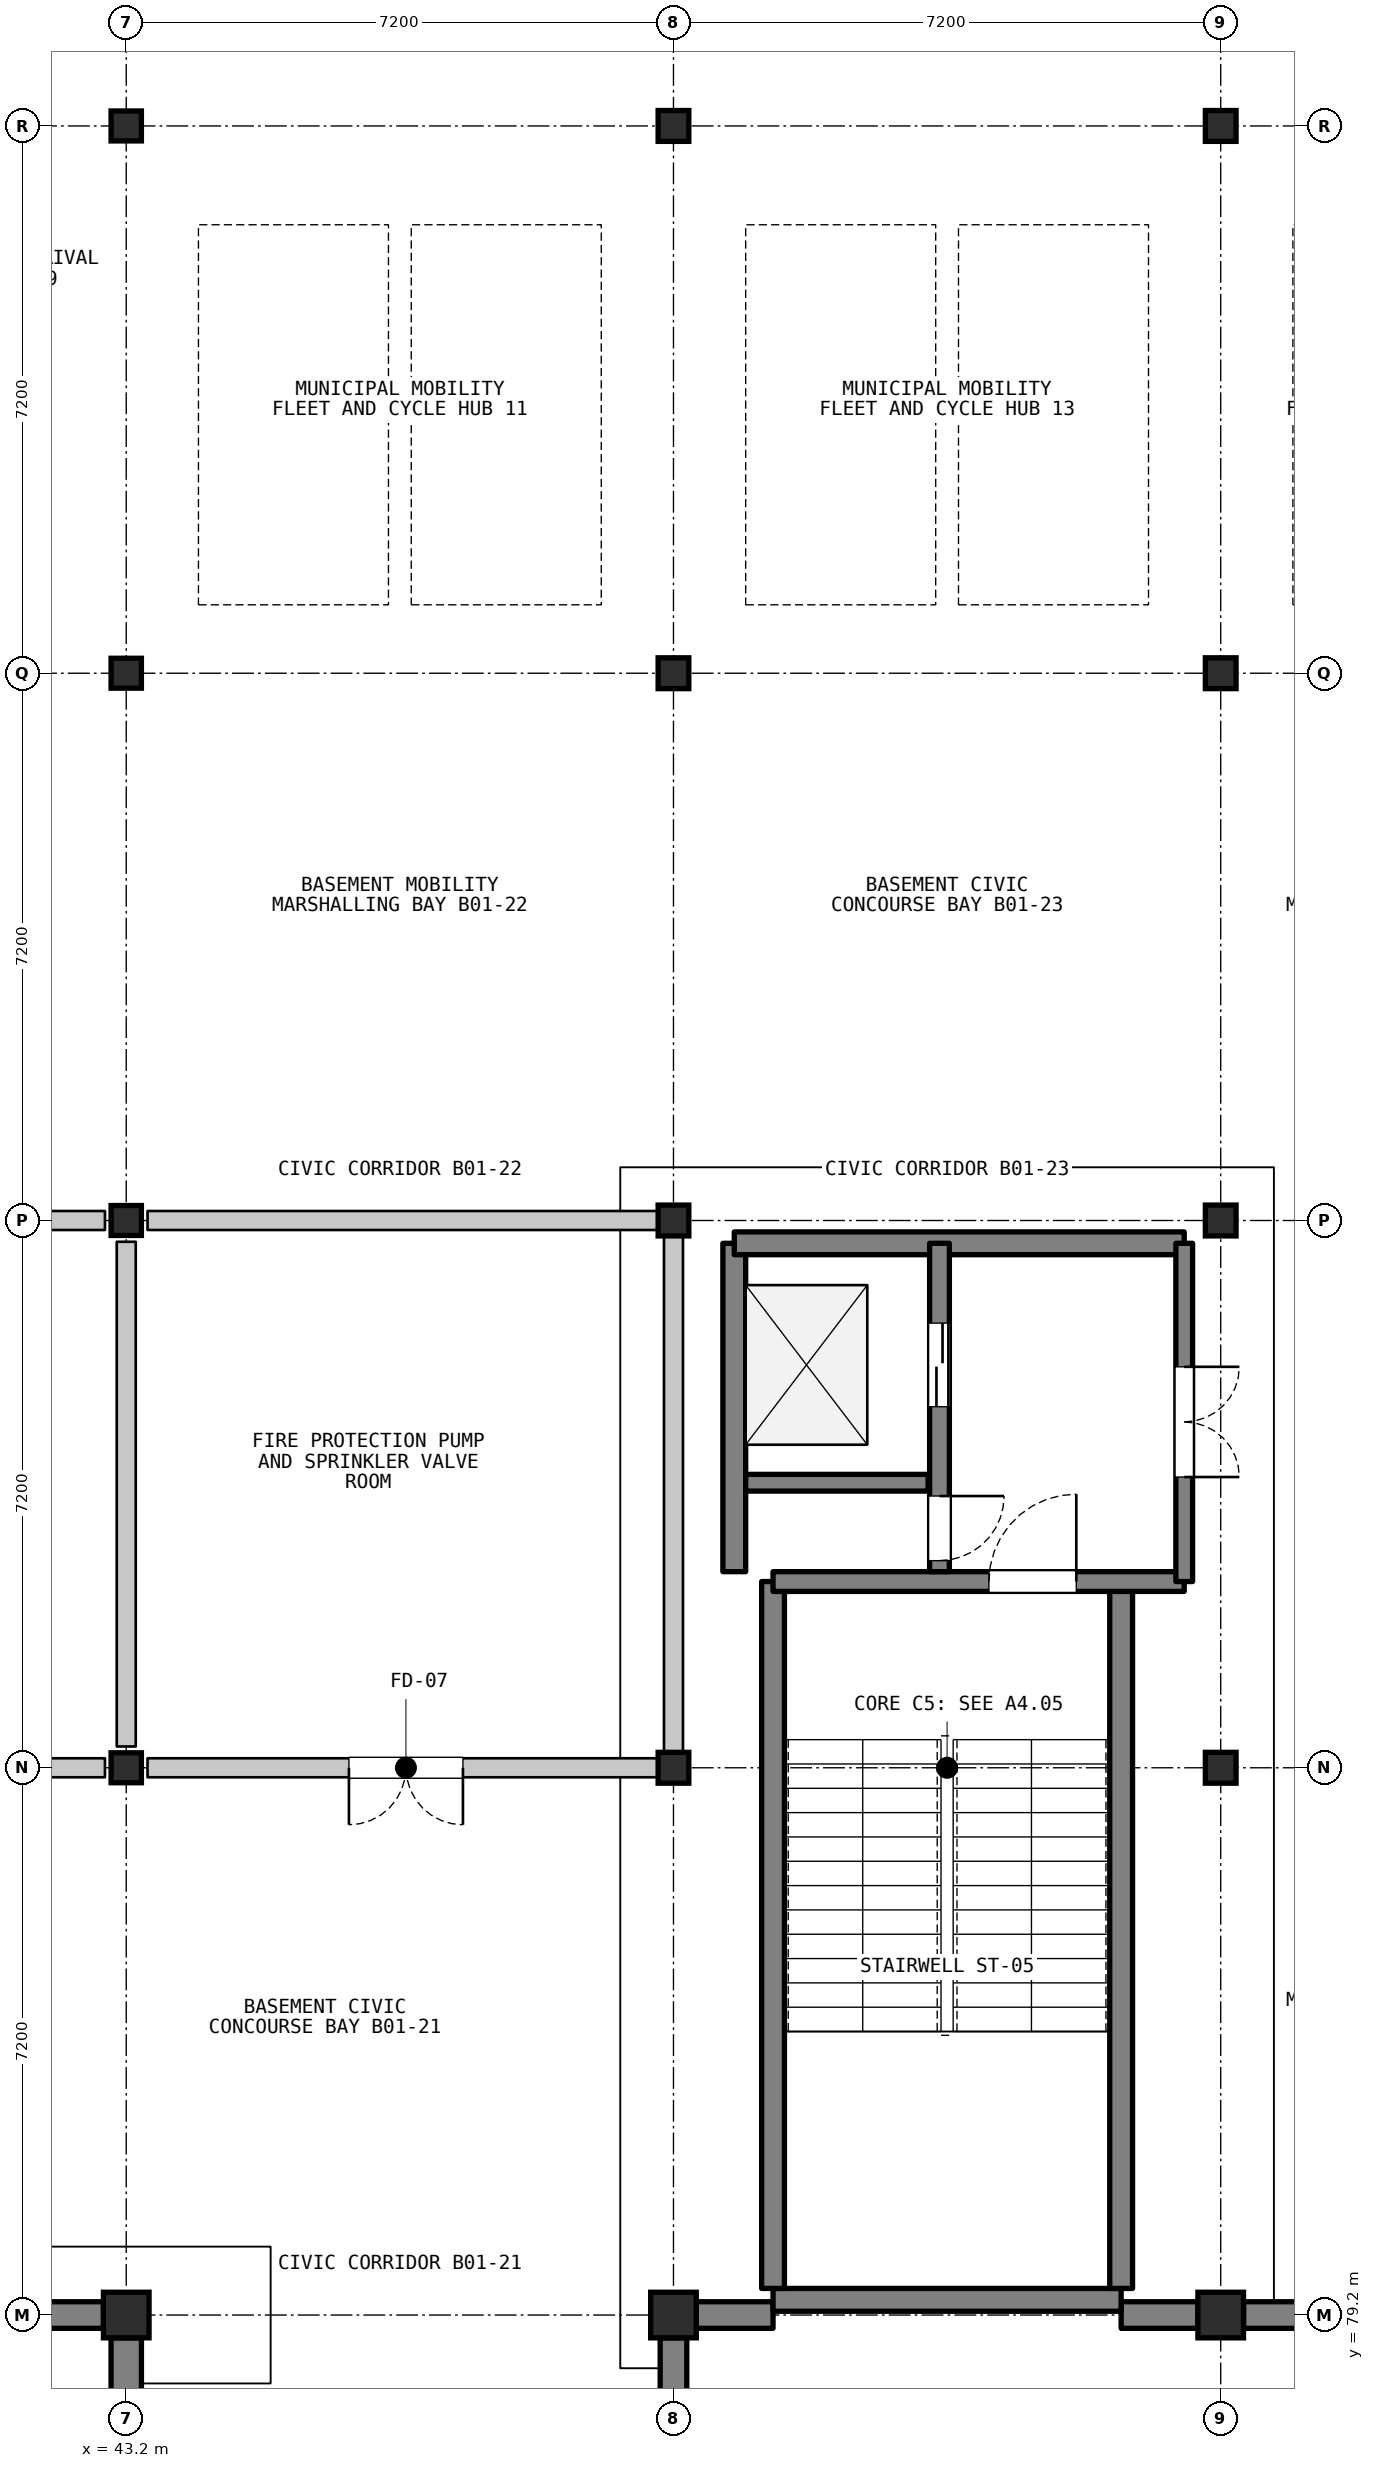
"""IFC4 building model, lengths in metres.
Left out: names, types, materials, properties, quantities, classifications, styles, units other than length and angle.
Written with IfcOpenShell. Run it as: python <this file> out.ifc"""

import sys

from ifc_helpers import new_model, si_unit, direction, frame, frame_2d, origin, origin_2d, place, context, subcontext, project, spatial, rectangle, i_section, extrude, element, fill, save


model = new_model("IFC4")
c1 = context("Model", 3, precision=1e-05, world=origin(), true_north=direction((0.0, 1.0)))
c2 = subcontext(c1, "Body", "Model", "MODEL_VIEW")
j1 = project(units=[si_unit("LENGTHUNIT", "METRE"), si_unit("PLANEANGLEUNIT", "RADIAN")], contexts=[c1])
p1 = place(None, origin())
s1 = spatial("IfcSite", under=j1, at=p1, CompositionType="ELEMENT")
p2 = place(p1, origin())
s2 = spatial("IfcBuilding", under=s1, at=p2, CompositionType="ELEMENT")
p3 = place(p2, frame((0.0, 0.0, -4.2)))
s3 = spatial("IfcBuildingStorey", under=s2, at=p3, CompositionType="ELEMENT", Elevation=-4.2)
p4 = place(p3, frame((36.3, 79.2, 0.0), z_axis=(0.0, 0.0, 1.0), x_axis=(1.0, 0.0, 0.0)))
e1 = element("IfcWall", 1, at=p4, inside=s3, PredefinedType="USERDEFINED", context=c2, shape_type="SweptSolid", body=[
    extrude(rectangle(XDim=6.6, YDim=0.35, at=frame_2d((3.3, 0.0))), origin(), (0.0, 0.0, 1.0), 3.98),
])
p5 = place(p3, frame((43.2, 72.3, 0.0), z_axis=(0.0, 0.0, 1.0), x_axis=(0.0, 1.0, 0.0)))
e2 = element("IfcWall", 2, at=p5, inside=s3, PredefinedType="USERDEFINED", context=c2, shape_type="SweptSolid", body=[
    extrude(rectangle(XDim=6.6, YDim=0.4, at=frame_2d((3.3, 0.0))), origin(), (0.0, 0.0, 1.0), 3.98),
])
p6 = place(p3, frame((50.4, 72.3, 0.0), z_axis=(0.0, 0.0, 1.0), x_axis=(0.0, 1.0, 0.0)))
e3 = element("IfcWall", 3, at=p6, inside=s3, PredefinedType="USERDEFINED", context=c2, shape_type="SweptSolid", body=[
    extrude(rectangle(XDim=6.6, YDim=0.35, at=frame_2d((3.3, 0.0))), origin(), (0.0, 0.0, 1.0), 3.98),
])
for number, where, z_axis, x_axis in (
    (4, (50.7, 79.2, 0.0), (0.0, 0.0, 1.0), (1.0, 0.0, 0.0)),
    (5, (56.29, 79.2, 0.0), (0.0, 0.0, 1.0), (1.0, 0.0, 0.0)),
):
    element("IfcWall", number, at=place(p3, frame(where, z_axis=z_axis, x_axis=x_axis)), inside=s3, PredefinedType="USERDEFINED", context=c2, shape_type="SweptSolid", body=[
        extrude(rectangle(XDim=1.01, YDim=0.35, at=frame_2d((0.505, 0.0))), origin(), (0.0, 0.0, 1.0), 3.98),
    ])
p7 = place(p3, frame((57.9, 79.2, 0.0), z_axis=(0.0, 0.0, 1.0), x_axis=(1.0, 0.0, 0.0)))
e6 = element("IfcWall", 6, at=p7, inside=s3, PredefinedType="USERDEFINED", context=c2, shape_type="SweptSolid", body=[
    extrude(rectangle(XDim=6.6, YDim=0.35, at=frame_2d((3.3, 0.0))), origin(), (0.0, 0.0, 1.0), 3.98),
])
p8 = place(p3, frame((43.2, 79.2, 0.0), z_axis=(0.0, 0.0, 1.0), x_axis=(1.0, 0.0, 0.0)))
e7 = element("IfcColumn", 7, at=p8, inside=s3, PredefinedType="COLUMN", context=c2, shape_type="SweptSolid", body=[
    extrude(rectangle(XDim=0.6, YDim=0.6, at=origin_2d()), origin(), (0.0, 0.0, 1.0), 4.2),
])
for number, where, z_axis, x_axis in (
    (8, (43.2, 86.4, 0.0), (0.0, 0.0, 1.0), (1.0, 0.0, 0.0)),
    (9, (43.2, 93.6, 0.0), (0.0, 0.0, 1.0), (1.0, 0.0, 0.0)),
    (10, (43.2, 100.8, 0.0), (0.0, 0.0, 1.0), (1.0, 0.0, 0.0)),
    (11, (43.2, 108.0, 0.0), (0.0, 0.0, 1.0), (1.0, 0.0, 0.0)),
):
    element("IfcColumn", number, at=place(p3, frame(where, z_axis=z_axis, x_axis=x_axis)), inside=s3, PredefinedType="COLUMN", context=c2, shape_type="SweptSolid", body=[
        extrude(i_section(OverallWidth=0.399, OverallDepth=0.394, WebThickness=0.023, FlangeThickness=0.037, FilletRadius=0.015, at=origin_2d()), origin(), (0.0, 0.0, 1.0), 4.2),
    ])
p9 = place(p3, frame((50.4, 79.2, 0.0), z_axis=(0.0, 0.0, 1.0), x_axis=(1.0, 0.0, 0.0)))
e12 = element("IfcColumn", 12, at=p9, inside=s3, PredefinedType="COLUMN", context=c2, shape_type="SweptSolid", body=[
    extrude(rectangle(XDim=0.6, YDim=0.6, at=origin_2d()), origin(), (0.0, 0.0, 1.0), 4.2),
])
for number, where, z_axis, x_axis in (
    (13, (50.4, 86.4, 0.0), (0.0, 0.0, 1.0), (1.0, 0.0, 0.0)),
    (14, (50.4, 93.6, 0.0), (0.0, 0.0, 1.0), (1.0, 0.0, 0.0)),
    (15, (50.4, 100.8, 0.0), (0.0, 0.0, 1.0), (1.0, 0.0, 0.0)),
    (16, (50.4, 108.0, 0.0), (0.0, 0.0, 1.0), (1.0, 0.0, 0.0)),
):
    element("IfcColumn", number, at=place(p3, frame(where, z_axis=z_axis, x_axis=x_axis)), inside=s3, PredefinedType="COLUMN", context=c2, shape_type="SweptSolid", body=[
        extrude(i_section(OverallWidth=0.404, OverallDepth=0.406, WebThickness=0.027, FlangeThickness=0.044, FilletRadius=0.015, at=origin_2d()), origin(), (0.0, 0.0, 1.0), 4.2),
    ])
p10 = place(p3, frame((57.6, 79.2, 0.0), z_axis=(0.0, 0.0, 1.0), x_axis=(1.0, 0.0, 0.0)))
e17 = element("IfcColumn", 17, at=p10, inside=s3, PredefinedType="COLUMN", context=c2, shape_type="SweptSolid", body=[
    extrude(rectangle(XDim=0.6, YDim=0.6, at=origin_2d()), origin(), (0.0, 0.0, 1.0), 4.2),
])
for number, where, z_axis, x_axis in (
    (18, (57.6, 86.4, 0.0), (0.0, 0.0, 1.0), (1.0, 0.0, 0.0)),
    (19, (57.6, 93.6, 0.0), (0.0, 0.0, 1.0), (1.0, 0.0, 0.0)),
    (20, (57.6, 100.8, 0.0), (0.0, 0.0, 1.0), (1.0, 0.0, 0.0)),
    (21, (57.6, 108.0, 0.0), (0.0, 0.0, 1.0), (1.0, 0.0, 0.0)),
):
    element("IfcColumn", number, at=place(p3, frame(where, z_axis=z_axis, x_axis=x_axis)), inside=s3, PredefinedType="COLUMN", context=c2, shape_type="SweptSolid", body=[
        extrude(i_section(OverallWidth=0.404, OverallDepth=0.406, WebThickness=0.027, FlangeThickness=0.044, FilletRadius=0.015, at=origin_2d()), origin(), (0.0, 0.0, 1.0), 4.2),
    ])
p11 = place(p3, frame((51.71, 79.4, 0.0), z_axis=(0.0, 0.0, 1.0), x_axis=(1.0, 0.0, 0.0)))
e22 = element("IfcWall", 22, at=p11, inside=s3, PredefinedType="SHEAR", context=c2, shape_type="SweptSolid", body=[
    extrude(rectangle(XDim=4.58, YDim=0.3, at=frame_2d((2.29, 0.0))), origin(), (0.0, 0.0, 1.0), 3.98),
])
for number, where, z_axis, x_axis in (
    (23, (51.71, 79.55, 0.0), (0.0, 0.0, 1.0), (0.0, 1.0, 0.0)),
    (24, (56.29, 79.55, 0.0), (0.0, 0.0, 1.0), (0.0, 1.0, 0.0)),
):
    element("IfcWall", number, at=place(p3, frame(where, z_axis=z_axis, x_axis=x_axis)), inside=s3, PredefinedType="SHEAR", context=c2, shape_type="SweptSolid", body=[
        extrude(rectangle(XDim=9.3, YDim=0.3, at=frame_2d((4.65, 0.0))), origin(), (0.0, 0.0, 1.0), 3.98),
    ])
p12 = place(p3, frame((51.71, 88.85, 0.0), z_axis=(0.0, 0.0, 1.0), x_axis=(1.0, 0.0, 0.0)))
e25 = element("IfcWall", 25, at=p12, inside=s3, PredefinedType="SHEAR", context=c2, shape_type="SweptSolid", body=[
    extrude(rectangle(XDim=5.41, YDim=0.26, at=frame_2d((2.705, 0.0))), origin(), (0.0, 0.0, 1.0), 3.98),
])
p13 = place(p12, frame((2.84, 0.0, 0.0)))
e26 = element("IfcOpeningElement", 26, at=p13, cuts=e25, PredefinedType="OPENING", context=c2, shape_type="SweptSolid", body=[
    extrude(rectangle(XDim=1.15, YDim=2.15, at=frame_2d((0.575, 1.075))), frame((0.0, 0.14, 0.0), z_axis=(0.0, -1.0, 0.0), x_axis=(1.0, 0.0, 0.0)), (0.0, 0.0, 1.0), 0.28),
])
p14 = place(p3, frame((51.2, 88.98, 0.0), z_axis=(0.0, 0.0, 1.0), x_axis=(0.0, 1.0, 0.0)))
e27 = element("IfcWall", 27, at=p14, inside=s3, PredefinedType="SHEAR", context=c2, shape_type="SweptSolid", body=[
    extrude(rectangle(XDim=4.32, YDim=0.3, at=frame_2d((2.16, 0.0))), origin(), (0.0, 0.0, 1.0), 3.98),
])
p15 = place(p3, frame((51.2, 93.3, 0.0), z_axis=(0.0, 0.0, 1.0), x_axis=(1.0, 0.0, 0.0)))
e28 = element("IfcWall", 28, at=p15, inside=s3, PredefinedType="SHEAR", context=c2, shape_type="SweptSolid", body=[
    extrude(rectangle(XDim=5.92, YDim=0.3, at=frame_2d((2.96, 0.0))), origin(), (0.0, 0.0, 1.0), 3.98),
])
p16 = place(p3, frame((51.35, 90.15, 0.0), z_axis=(0.0, 0.0, 1.0), x_axis=(1.0, 0.0, 0.0)))
e29 = element("IfcWall", 29, at=p16, inside=s3, PredefinedType="SHEAR", context=c2, shape_type="SweptSolid", body=[
    extrude(rectangle(XDim=2.4, YDim=0.22, at=frame_2d((1.2, 0.0))), origin(), (0.0, 0.0, 1.0), 3.98),
])
p17 = place(p3, frame((53.9, 93.3, 0.0), z_axis=(0.0, 0.0, 1.0), x_axis=(0.0, -1.0, 0.0)))
e30 = element("IfcWall", 30, at=p17, inside=s3, PredefinedType="SHEAR", context=c2, shape_type="SweptSolid", body=[
    extrude(rectangle(XDim=4.32, YDim=0.26, at=frame_2d((2.16, 0.0))), origin(), (0.0, 0.0, 1.0), 3.98),
])
p18 = place(p17, frame((1.05, 0.0, 0.0)))
e31 = element("IfcOpeningElement", 31, at=p18, cuts=e30, PredefinedType="OPENING", context=c2, shape_type="SweptSolid", body=[
    extrude(rectangle(XDim=1.1, YDim=2.15, at=frame_2d((0.55, 1.075))), frame((0.0, 0.14, 0.0), z_axis=(0.0, -1.0, 0.0), x_axis=(1.0, 0.0, 0.0)), (0.0, 0.0, 1.0), 0.28),
])
p19 = place(p17, frame((3.325, 0.0, 0.0)))
e32 = element("IfcOpeningElement", 32, at=p19, cuts=e30, PredefinedType="OPENING", context=c2, shape_type="SweptSolid", body=[
    extrude(rectangle(XDim=0.85, YDim=2.05, at=frame_2d((0.425, 1.025))), frame((0.0, 0.14, 0.0), z_axis=(0.0, -1.0, 0.0), x_axis=(1.0, 0.0, 0.0)), (0.0, 0.0, 1.0), 0.28),
])
p20 = place(p3, frame((57.12, 93.3, 0.0), z_axis=(0.0, 0.0, 1.0), x_axis=(0.0, -1.0, 0.0)))
e33 = element("IfcWall", 33, at=p20, inside=s3, PredefinedType="SHEAR", context=c2, shape_type="SweptSolid", body=[
    extrude(rectangle(XDim=4.45, YDim=0.22, at=frame_2d((2.225, 0.0))), origin(), (0.0, 0.0, 1.0), 3.98),
])
p21 = place(p20, frame((1.625, 0.0, 0.0)))
e34 = element("IfcOpeningElement", 34, at=p21, cuts=e33, PredefinedType="OPENING", context=c2, shape_type="SweptSolid", body=[
    extrude(rectangle(XDim=1.45, YDim=2.2, at=frame_2d((0.725, 1.1))), frame((0.0, 0.12, 0.0), z_axis=(0.0, -1.0, 0.0), x_axis=(1.0, 0.0, 0.0)), (0.0, 0.0, 1.0), 0.24),
])
p22 = place(p3, frame((42.92, 86.4, 0.0), z_axis=(0.0, 0.0, 1.0), x_axis=(-1.0, 0.0, 0.0)))
e35 = element("IfcWall", 35, at=p22, inside=s3, PredefinedType="PARTITIONING", context=c2, shape_type="SweptSolid", body=[
    extrude(rectangle(XDim=6.8, YDim=0.25, at=frame_2d((3.4, 0.0))), origin(), (0.0, 0.0, 1.0), 3.368),
])
p23 = place(p22, frame((2.65, 0.0, 0.0)))
e36 = element("IfcOpeningElement", 36, at=p23, cuts=e35, PredefinedType="OPENING", context=c2, shape_type="SweptSolid", body=[
    extrude(rectangle(XDim=1.5, YDim=2.25, at=frame_2d((0.75, 1.125))), frame((0.0, 0.135, 0.0), z_axis=(0.0, -1.0, 0.0), x_axis=(1.0, 0.0, 0.0)), (0.0, 0.0, 1.0), 0.27),
])
p24 = place(p3, frame((36.12, 93.6, 0.0), z_axis=(0.0, 0.0, 1.0), x_axis=(1.0, 0.0, 0.0)))
e37 = element("IfcWall", 37, at=p24, inside=s3, PredefinedType="PARTITIONING", context=c2, shape_type="SweptSolid", body=[
    extrude(rectangle(XDim=6.8, YDim=0.25, at=frame_2d((3.4, 0.0))), origin(), (0.0, 0.0, 1.0), 3.368),
])
p25 = place(p3, frame((43.2, 93.32, 0.0), z_axis=(0.0, 0.0, 1.0), x_axis=(0.0, -1.0, 0.0)))
e38 = element("IfcWall", 38, at=p25, inside=s3, PredefinedType="PARTITIONING", context=c2, shape_type="SweptSolid", body=[
    extrude(rectangle(XDim=6.64, YDim=0.25, at=frame_2d((3.32, 0.0))), origin(), (0.0, 0.0, 1.0), 3.437),
])
p26 = place(p3, frame((50.28, 86.4, 0.0), z_axis=(0.0, 0.0, 1.0), x_axis=(-1.0, 0.0, 0.0)))
e39 = element("IfcWall", 39, at=p26, inside=s3, PredefinedType="PARTITIONING", context=c2, shape_type="SweptSolid", body=[
    extrude(rectangle(XDim=6.8, YDim=0.25, at=frame_2d((3.4, 0.0))), origin(), (0.0, 0.0, 1.0), 3.368),
])
p27 = place(p26, frame((2.65, 0.0, 0.0)))
e40 = element("IfcOpeningElement", 40, at=p27, cuts=e39, PredefinedType="OPENING", context=c2, shape_type="SweptSolid", body=[
    extrude(rectangle(XDim=1.5, YDim=2.25, at=frame_2d((0.75, 1.125))), frame((0.0, 0.135, 0.0), z_axis=(0.0, -1.0, 0.0), x_axis=(1.0, 0.0, 0.0)), (0.0, 0.0, 1.0), 0.27),
])
p28 = place(p3, frame((43.48, 93.6, 0.0), z_axis=(0.0, 0.0, 1.0), x_axis=(1.0, 0.0, 0.0)))
e41 = element("IfcWall", 41, at=p28, inside=s3, PredefinedType="PARTITIONING", context=c2, shape_type="SweptSolid", body=[
    extrude(rectangle(XDim=6.8, YDim=0.25, at=frame_2d((3.4, 0.0))), origin(), (0.0, 0.0, 1.0), 3.368),
])
p29 = place(p3, frame((50.4, 93.48, 0.0), z_axis=(0.0, 0.0, 1.0), x_axis=(0.0, -1.0, 0.0)))
e42 = element("IfcWall", 42, at=p29, inside=s3, PredefinedType="PARTITIONING", context=c2, shape_type="SweptSolid", body=[
    extrude(rectangle(XDim=6.96, YDim=0.25, at=frame_2d((3.48, 0.0))), origin(), (0.0, 0.0, 1.0), 3.368),
])
p30 = place(p13, origin())
e43 = element("IfcDoor", 43, at=p30, inside=s3, OperationType="SINGLE_SWING_RIGHT", PredefinedType="DOOR", context=c2, shape_type="SweptSolid", body=[
    extrude(rectangle(XDim=1.15, YDim=2.15, at=frame_2d((0.575, 1.075))), frame((0.0, 0.025, 0.0), z_axis=(0.0, -1.0, 0.0), x_axis=(1.0, 0.0, 0.0)), (0.0, 0.0, 1.0), 0.05),
])
fill(e26, e43)
p31 = place(p18, origin())
e44 = element("IfcDoor", 44, at=p31, inside=s3, OperationType="DOUBLE_DOOR_SLIDING", PredefinedType="DOOR", context=c2, shape_type="SweptSolid", body=[
    extrude(rectangle(XDim=1.1, YDim=2.15, at=frame_2d((0.55, 1.075))), frame((0.0, 0.025, 0.0), z_axis=(0.0, -1.0, 0.0), x_axis=(1.0, 0.0, 0.0)), (0.0, 0.0, 1.0), 0.05),
])
fill(e31, e44)
p32 = place(p19, origin())
e45 = element("IfcDoor", 45, at=p32, inside=s3, OperationType="SINGLE_SWING_LEFT", PredefinedType="DOOR", context=c2, shape_type="SweptSolid", body=[
    extrude(rectangle(XDim=0.85, YDim=2.05, at=frame_2d((0.425, 1.025))), frame((0.0, 0.025, 0.0), z_axis=(0.0, -1.0, 0.0), x_axis=(1.0, 0.0, 0.0)), (0.0, 0.0, 1.0), 0.05),
])
fill(e32, e45)
p33 = place(p21, origin())
e46 = element("IfcDoor", 46, at=p33, inside=s3, OperationType="DOUBLE_DOOR_SINGLE_SWING", PredefinedType="DOOR", context=c2, shape_type="SweptSolid", body=[
    extrude(rectangle(XDim=1.45, YDim=2.2, at=frame_2d((0.725, 1.1))), frame((0.0, 0.025, 0.0), z_axis=(0.0, -1.0, 0.0), x_axis=(1.0, 0.0, 0.0)), (0.0, 0.0, 1.0), 0.05),
])
fill(e34, e46)
p34 = place(p27, origin())
e47 = element("IfcDoor", 47, at=p34, inside=s3, OperationType="DOUBLE_DOOR_SINGLE_SWING", PredefinedType="DOOR", context=c2, shape_type="SweptSolid", body=[
    extrude(rectangle(XDim=1.5, YDim=2.25, at=frame_2d((0.75, 1.125))), frame((0.0, 0.025, 0.0), z_axis=(0.0, -1.0, 0.0), x_axis=(1.0, 0.0, 0.0)), (0.0, 0.0, 1.0), 0.05),
])
fill(e40, e47)
save(model, sys.argv[1])
